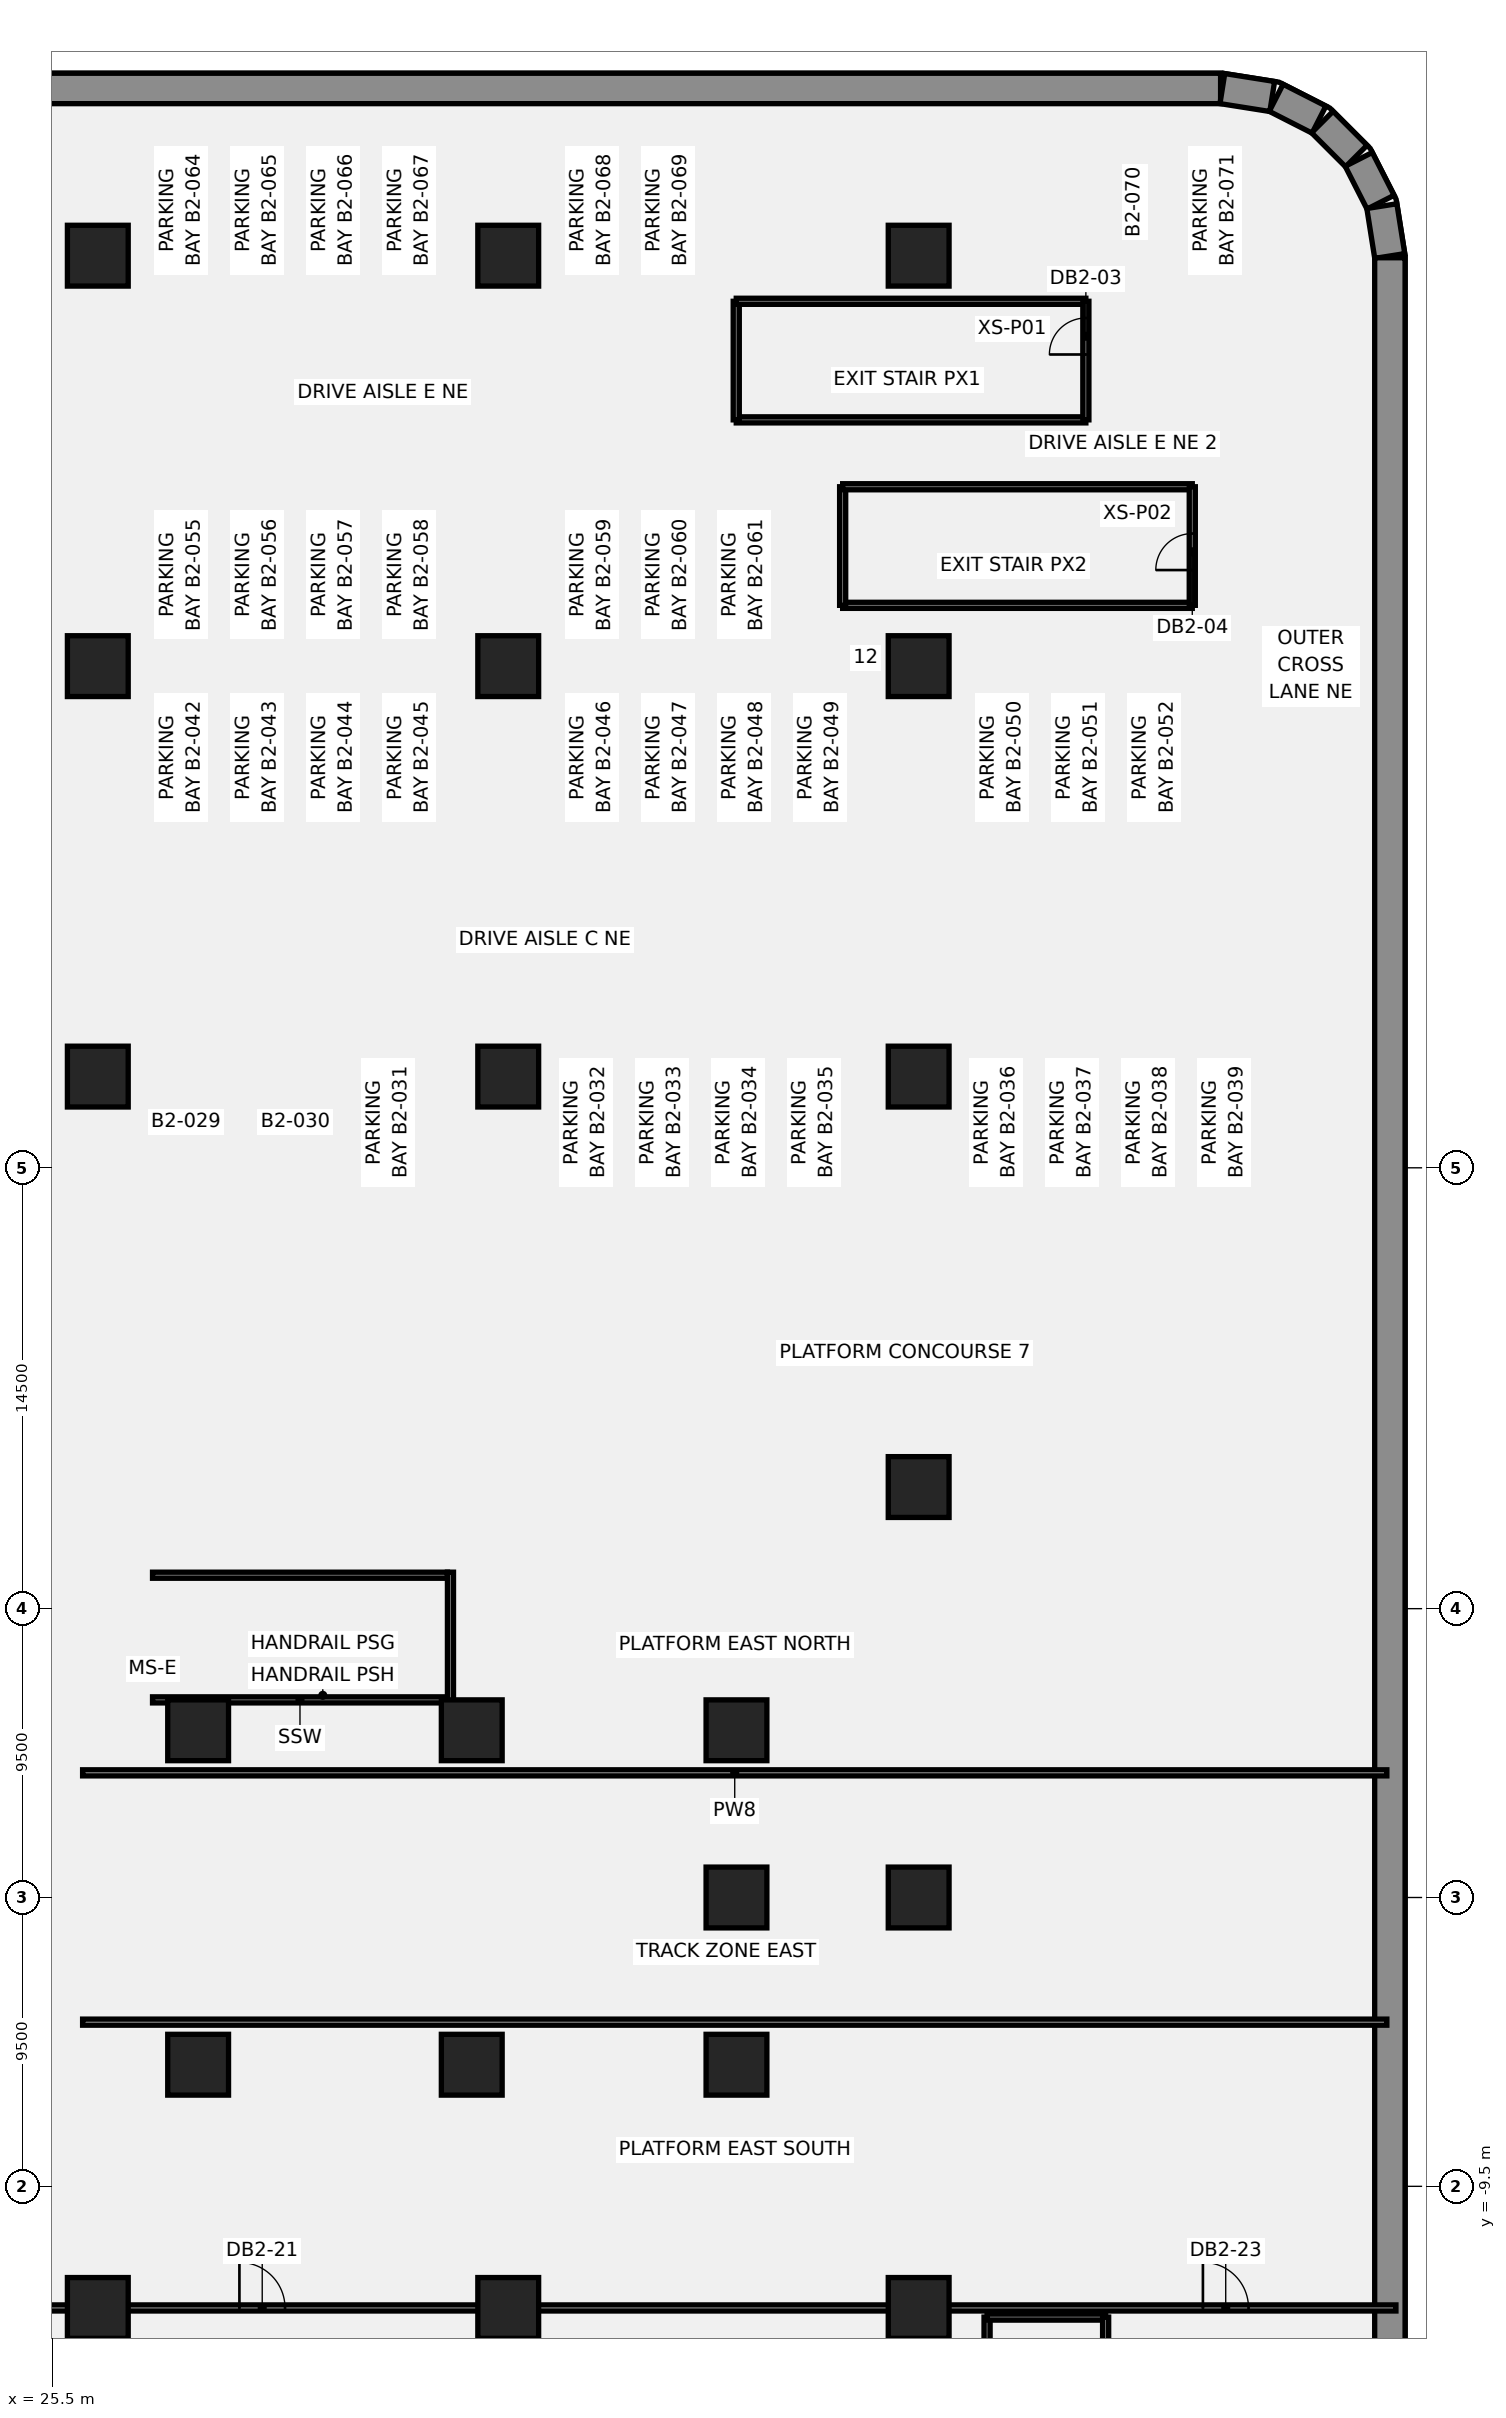
"""IFC4 building model, lengths in metres.
Left out: names, types, materials, properties, quantities, classifications, styles, units other than length and angle.
Written with IfcOpenShell. Run it as: python <this file> out.ifc"""

import sys

from ifc_helpers import new_model, si_unit, direction, frame, frame_2d, origin, origin_2d, place, context, subcontext, project, spatial, rectangle, extrude, element, fill, save


model = new_model("IFC4")
c1 = context("Model", 3, precision=1e-05, world=origin(), true_north=direction((0.0, 1.0)))
c2 = subcontext(c1, "Body", "Model", "MODEL_VIEW")
j1 = project(units=[si_unit("LENGTHUNIT", "METRE"), si_unit("PLANEANGLEUNIT", "RADIAN")], contexts=[c1])
p1 = place(None, origin())
s1 = spatial("IfcSite", under=j1, at=p1, CompositionType="ELEMENT")
p2 = place(p1, origin())
s2 = spatial("IfcBuilding", under=s1, at=p2, CompositionType="ELEMENT")
p3 = place(p2, frame((0.0, 0.0, -14.0)))
s3 = spatial("IfcBuildingStorey", under=s2, at=p3, CompositionType="ELEMENT", Elevation=-14.0)
p4 = place(p3, frame((-63.931, 59.5, -0.45), z_axis=(0.0, 0.0, 1.0), x_axis=(1.0, 0.0, 0.0)))
e1 = element("IfcWall", 1, at=p4, inside=s3, PredefinedType="SOLIDWALL", context=c2, shape_type="SweptSolid", body=[
    extrude(rectangle(XDim=127.863, YDim=1.0, at=frame_2d((63.931, 0.0))), origin(), (0.0, 0.0, 1.0), 7.0),
])
p5 = place(p3, frame((63.99, 59.495, -0.45), z_axis=(0.0, 0.0, 1.0), x_axis=(0.987688946427, -0.156430639922, 0.0)))
e2 = element("IfcWall", 2, at=p5, inside=s3, PredefinedType="SOLIDWALL", context=c2, shape_type="SweptSolid", body=[
    extrude(rectangle(XDim=1.661, YDim=1.0, at=frame_2d((0.83, 0.0))), origin(), (0.0, 0.0, 1.0), 7.0),
])
for number, where, z_axis, x_axis in (
    (3, (65.759, 59.194, -0.45), (0.0, 0.0, 1.0), (0.891, -0.454, 0.0)),
    (4, (67.278, 58.396, -0.45), (0.0, 0.0, 1.0), (0.707, -0.707, 0.0)),
    (5, (68.476, 57.168, -0.45), (0.0, 0.0, 1.0), (0.454, -0.891, 0.0)),
):
    element("IfcWall", number, at=place(p3, frame(where, z_axis=z_axis, x_axis=x_axis)), inside=s3, PredefinedType="SOLIDWALL", context=c2, shape_type="SweptSolid", body=[
        extrude(rectangle(XDim=1.581, YDim=1.0, at=frame_2d((0.791, 0.0))), origin(), (0.0, 0.0, 1.0), 7.0),
    ])
p6 = place(p3, frame((69.236, 55.63, -0.45), z_axis=(0.0, 0.0, 1.0), x_axis=(0.156430639922, -0.987688946427, 0.0)))
e6 = element("IfcWall", 6, at=p6, inside=s3, PredefinedType="SOLIDWALL", context=c2, shape_type="SweptSolid", body=[
    extrude(rectangle(XDim=1.661, YDim=1.0, at=frame_2d((0.83, 0.0))), origin(), (0.0, 0.0, 1.0), 7.0),
])
p7 = place(p3, frame((69.5, 53.931, -0.45), z_axis=(0.0, 0.0, 1.0), x_axis=(0.0, -1.0, 0.0)))
e7 = element("IfcWall", 7, at=p7, inside=s3, PredefinedType="SOLIDWALL", context=c2, shape_type="SweptSolid", body=[
    extrude(rectangle(XDim=107.863, YDim=1.0, at=frame_2d((53.931, 0.0))), origin(), (0.0, 0.0, 1.0), 7.0),
])
for number, where, z_axis, x_axis in (
    (8, (39.3, 5.5, -0.45), (0.0, 0.0, 1.0), (1.0, 0.0, 0.0)),
    (9, (39.3, -5.5, -0.45), (0.0, 0.0, 1.0), (1.0, 0.0, 0.0)),
    (10, (30.3, 5.5, -0.45), (0.0, 0.0, 1.0), (1.0, 0.0, 0.0)),
    (11, (30.3, -5.5, -0.45), (0.0, 0.0, 1.0), (1.0, 0.0, 0.0)),
    (12, (48.008, -5.5, -0.45), (0.0, 0.0, 1.0), (1.0, 0.0, 0.0)),
    (13, (48.008, 0.0, -0.45), (0.0, 0.0, 1.0), (1.0, 0.0, 0.0)),
    (14, (48.008, 5.5, -0.45), (0.0, 0.0, 1.0), (1.0, 0.0, 0.0)),
    (15, (27.0, -13.5, -0.45), (0.0, 0.0, 1.0), (1.0, 0.0, 0.0)),
    (16, (27.0, 27.0, -0.45), (0.0, 0.0, 1.0), (1.0, 0.0, 0.0)),
    (17, (27.0, 40.5, -0.45), (0.0, 0.0, 1.0), (1.0, 0.0, 0.0)),
    (18, (27.0, 54.0, -0.45), (0.0, 0.0, 1.0), (1.0, 0.0, 0.0)),
    (19, (40.5, -13.5, -0.45), (0.0, 0.0, 1.0), (1.0, 0.0, 0.0)),
    (20, (40.5, 27.0, -0.45), (0.0, 0.0, 1.0), (1.0, 0.0, 0.0)),
    (21, (40.5, 40.5, -0.45), (0.0, 0.0, 1.0), (1.0, 0.0, 0.0)),
    (22, (40.5, 54.0, -0.45), (0.0, 0.0, 1.0), (1.0, 0.0, 0.0)),
    (23, (54.0, -13.5, -0.45), (0.0, 0.0, 1.0), (1.0, 0.0, 0.0)),
    (24, (54.0, 0.0, -0.45), (0.0, 0.0, 1.0), (1.0, 0.0, 0.0)),
    (25, (54.0, 13.5, -0.45), (0.0, 0.0, 1.0), (1.0, 0.0, 0.0)),
    (26, (54.0, 27.0, -0.45), (0.0, 0.0, 1.0), (1.0, 0.0, 0.0)),
    (27, (54.0, 40.5, -0.45), (0.0, 0.0, 1.0), (1.0, 0.0, 0.0)),
    (28, (54.0, 54.0, -0.45), (0.0, 0.0, 1.0), (1.0, 0.0, 0.0)),
):
    element("IfcColumn", number, at=place(p3, frame(where, z_axis=z_axis, x_axis=x_axis)), inside=s3, PredefinedType="COLUMN", context=c2, shape_type="SweptSolid", body=[
        extrude(rectangle(XDim=2.0, YDim=2.0, at=origin_2d()), origin(), (0.0, 0.0, 1.0), 7.0),
    ])
p8 = place(p3, frame((56.25, -25.3, 0.0), z_axis=(0.0, 0.0, 1.0), x_axis=(0.0, 1.0, 0.0)))
e29 = element("IfcWall", 29, at=p8, inside=s3, PredefinedType="PARTITIONING", context=c2, shape_type="SweptSolid", body=[
    extrude(rectangle(XDim=11.5, YDim=0.2, at=frame_2d((5.75, 0.0))), origin(), (0.0, 0.0, 1.0), 6.55),
])
p9 = place(p3, frame((56.25, -13.8, 0.0), z_axis=(0.0, 0.0, 1.0), x_axis=(1.0, 0.0, 0.0)))
e30 = element("IfcWall", 30, at=p9, inside=s3, PredefinedType="PARTITIONING", context=c2, shape_type="SweptSolid", body=[
    extrude(rectangle(XDim=3.9, YDim=0.2, at=frame_2d((1.95, 0.0))), origin(), (0.0, 0.0, 1.0), 6.55),
])
for number, where, z_axis, x_axis in (
    (31, (60.15, -25.3, 0.0), (0.0, 0.0, 1.0), (0.0, 1.0, 0.0)),
    (32, (48.0, 48.6, 0.0), (0.0, 0.0, 1.0), (1.0, 0.0, 0.0)),
):
    element("IfcWall", number, at=place(p3, frame(where, z_axis=z_axis, x_axis=x_axis)), inside=s3, PredefinedType="PARTITIONING", context=c2, shape_type="SweptSolid", body=[
        extrude(rectangle(XDim=11.5, YDim=0.2, at=frame_2d((5.75, 0.0))), origin(), (0.0, 0.0, 1.0), 6.55),
    ])
p10 = place(p3, frame((48.0, 48.6, 0.0), z_axis=(0.0, 0.0, 1.0), x_axis=(0.0, 1.0, 0.0)))
e33 = element("IfcWall", 33, at=p10, inside=s3, PredefinedType="PARTITIONING", context=c2, shape_type="SweptSolid", body=[
    extrude(rectangle(XDim=3.9, YDim=0.2, at=frame_2d((1.95, 0.0))), origin(), (0.0, 0.0, 1.0), 6.55),
])
p11 = place(p3, frame((48.0, 52.5, 0.0), z_axis=(0.0, 0.0, 1.0), x_axis=(1.0, 0.0, 0.0)))
e34 = element("IfcWall", 34, at=p11, inside=s3, PredefinedType="PARTITIONING", context=c2, shape_type="SweptSolid", body=[
    extrude(rectangle(XDim=11.5, YDim=0.2, at=frame_2d((5.75, 0.0))), origin(), (0.0, 0.0, 1.0), 6.55),
])
p12 = place(p3, frame((59.5, 48.6, 0.0), z_axis=(0.0, 0.0, 1.0), x_axis=(0.0, 1.0, 0.0)))
e35 = element("IfcWall", 35, at=p12, inside=s3, PredefinedType="PARTITIONING", context=c2, shape_type="SweptSolid", body=[
    extrude(rectangle(XDim=3.9, YDim=0.2, at=frame_2d((1.95, 0.0))), origin(), (0.0, 0.0, 1.0), 6.55),
])
p13 = place(p12, frame((2.15, 0.0, 0.0)))
e36 = element("IfcOpeningElement", 36, at=p13, cuts=e35, PredefinedType="OPENING", context=c2, shape_type="SweptSolid", body=[
    extrude(rectangle(XDim=1.2, YDim=2.1, at=frame_2d((0.6, 1.05))), frame((0.0, 0.11, 0.0), z_axis=(0.0, -1.0, 0.0), x_axis=(1.0, 0.0, 0.0)), (0.0, 0.0, 1.0), 0.22),
])
p14 = place(p3, frame((51.5, 42.5, 0.0), z_axis=(0.0, 0.0, 1.0), x_axis=(1.0, 0.0, 0.0)))
e37 = element("IfcWall", 37, at=p14, inside=s3, PredefinedType="PARTITIONING", context=c2, shape_type="SweptSolid", body=[
    extrude(rectangle(XDim=11.5, YDim=0.2, at=frame_2d((5.75, 0.0))), origin(), (0.0, 0.0, 1.0), 6.55),
])
p15 = place(p3, frame((51.5, 42.5, 0.0), z_axis=(0.0, 0.0, 1.0), x_axis=(0.0, 1.0, 0.0)))
e38 = element("IfcWall", 38, at=p15, inside=s3, PredefinedType="PARTITIONING", context=c2, shape_type="SweptSolid", body=[
    extrude(rectangle(XDim=3.9, YDim=0.2, at=frame_2d((1.95, 0.0))), origin(), (0.0, 0.0, 1.0), 6.55),
])
p16 = place(p3, frame((51.5, 46.4, 0.0), z_axis=(0.0, 0.0, 1.0), x_axis=(1.0, 0.0, 0.0)))
e39 = element("IfcWall", 39, at=p16, inside=s3, PredefinedType="PARTITIONING", context=c2, shape_type="SweptSolid", body=[
    extrude(rectangle(XDim=11.5, YDim=0.2, at=frame_2d((5.75, 0.0))), origin(), (0.0, 0.0, 1.0), 6.55),
])
p17 = place(p3, frame((63.0, 42.5, 0.0), z_axis=(0.0, 0.0, 1.0), x_axis=(0.0, 1.0, 0.0)))
e40 = element("IfcWall", 40, at=p17, inside=s3, PredefinedType="PARTITIONING", context=c2, shape_type="SweptSolid", body=[
    extrude(rectangle(XDim=3.9, YDim=0.2, at=frame_2d((1.95, 0.0))), origin(), (0.0, 0.0, 1.0), 6.55),
])
p18 = place(p17, frame((1.16, 0.0, 0.0)))
e41 = element("IfcOpeningElement", 41, at=p18, cuts=e40, PredefinedType="OPENING", context=c2, shape_type="SweptSolid", body=[
    extrude(rectangle(XDim=1.2, YDim=2.1, at=frame_2d((0.6, 1.05))), frame((0.0, 0.11, 0.0), z_axis=(0.0, -1.0, 0.0), x_axis=(1.0, 0.0, 0.0)), (0.0, 0.0, 1.0), 0.22),
])
p19 = place(p3, frame((40.5, -22.5, 0.0), z_axis=(0.0, 0.0, 1.0), x_axis=(0.0, 1.0, 0.0)))
e42 = element("IfcWall", 42, at=p19, inside=s3, PredefinedType="PARTITIONING", context=c2, shape_type="SweptSolid", body=[
    extrude(rectangle(XDim=9.0, YDim=0.2, at=frame_2d((4.5, 0.0))), origin(), (0.0, 0.0, 1.0), 6.55),
])
p20 = place(p3, frame((22.5, -13.5, 0.0), z_axis=(0.0, 0.0, 1.0), x_axis=(1.0, 0.0, 0.0)))
e43 = element("IfcWall", 43, at=p20, inside=s3, PredefinedType="PARTITIONING", context=c2, shape_type="SweptSolid", body=[
    extrude(rectangle(XDim=47.199, YDim=0.2, at=frame_2d((23.6, 0.0))), origin(), (0.0, 0.0, 1.0), 6.55),
])
p21 = place(p20, frame((9.158, 0.0, 0.0)))
e44 = element("IfcOpeningElement", 44, at=p21, cuts=e43, PredefinedType="OPENING", context=c2, shape_type="SweptSolid", body=[
    extrude(rectangle(XDim=1.5, YDim=2.1, at=frame_2d((0.75, 1.05))), frame((0.0, 0.11, 0.0), z_axis=(0.0, -1.0, 0.0), x_axis=(1.0, 0.0, 0.0)), (0.0, 0.0, 1.0), 0.22),
])
p22 = place(p20, frame((40.85, 0.0, 0.0)))
e45 = element("IfcOpeningElement", 45, at=p22, cuts=e43, PredefinedType="OPENING", context=c2, shape_type="SweptSolid", body=[
    extrude(rectangle(XDim=1.5, YDim=2.1, at=frame_2d((0.75, 1.05))), frame((0.0, 0.11, 0.0), z_axis=(0.0, -1.0, 0.0), x_axis=(1.0, 0.0, 0.0)), (0.0, 0.0, 1.0), 0.22),
])
for number, where, z_axis, x_axis in (
    (46, (26.5, 4.1, 0.0), (0.0, 0.0, 1.0), (1.0, 0.0, 0.0)),
    (47, (26.5, -4.1, 0.0), (0.0, 0.0, 1.0), (1.0, 0.0, 0.0)),
):
    element("IfcWall", number, at=place(p3, frame(where, z_axis=z_axis, x_axis=x_axis)), inside=s3, PredefinedType="PARTITIONING", context=c2, shape_type="SweptSolid", body=[
        extrude(rectangle(XDim=42.9, YDim=0.2, at=frame_2d((21.45, 0.0))), origin(), (0.0, 0.0, 1.0), 6.55),
    ])
for number, where, z_axis, x_axis in (
    (48, (28.8, 6.5, 0.0), (0.0, 0.0, 1.0), (1.0, 0.0, 0.0)),
    (49, (28.8, 10.6, 0.0), (0.0, 0.0, 1.0), (1.0, 0.0, 0.0)),
):
    element("IfcWall", number, at=place(p3, frame(where, z_axis=z_axis, x_axis=x_axis)), inside=s3, PredefinedType="SOLIDWALL", context=c2, shape_type="SweptSolid", body=[
        extrude(rectangle(XDim=9.7, YDim=0.2, at=frame_2d((4.85, 0.0))), origin(), (0.0, 0.0, 1.0), 6.55),
    ])
p23 = place(p3, frame((38.6, 6.4, 0.0), z_axis=(0.0, 0.0, 1.0), x_axis=(0.0, 1.0, 0.0)))
e50 = element("IfcWall", 50, at=p23, inside=s3, PredefinedType="SOLIDWALL", context=c2, shape_type="SweptSolid", body=[
    extrude(rectangle(XDim=4.3, YDim=0.2, at=frame_2d((2.15, 0.0))), origin(), (0.0, 0.0, 1.0), 6.55),
])
p24 = place(p13, origin())
e51 = element("IfcDoor", 51, at=p24, inside=s3, OperationType="SINGLE_SWING_LEFT", PredefinedType="DOOR", context=c2, shape_type="SweptSolid", body=[
    extrude(rectangle(XDim=1.2, YDim=2.1, at=frame_2d((0.6, 1.05))), frame((0.0, 0.025, 0.0), z_axis=(0.0, -1.0, 0.0), x_axis=(1.0, 0.0, 0.0)), (0.0, 0.0, 1.0), 0.05),
])
fill(e36, e51)
p25 = place(p18, origin())
e52 = element("IfcDoor", 52, at=p25, inside=s3, OperationType="SINGLE_SWING_RIGHT", PredefinedType="DOOR", context=c2, shape_type="SweptSolid", body=[
    extrude(rectangle(XDim=1.2, YDim=2.1, at=frame_2d((0.6, 1.05))), frame((0.0, 0.025, 0.0), z_axis=(0.0, -1.0, 0.0), x_axis=(1.0, 0.0, 0.0)), (0.0, 0.0, 1.0), 0.05),
])
fill(e41, e52)
p26 = place(p21, origin())
e53 = element("IfcDoor", 53, at=p26, inside=s3, OperationType="SINGLE_SWING_LEFT", PredefinedType="DOOR", context=c2, shape_type="SweptSolid", body=[
    extrude(rectangle(XDim=1.5, YDim=2.1, at=frame_2d((0.75, 1.05))), frame((0.0, 0.025, 0.0), z_axis=(0.0, -1.0, 0.0), x_axis=(1.0, 0.0, 0.0)), (0.0, 0.0, 1.0), 0.05),
])
fill(e44, e53)
p27 = place(p22, origin())
e54 = element("IfcDoor", 54, at=p27, inside=s3, OperationType="SINGLE_SWING_LEFT", PredefinedType="DOOR", context=c2, shape_type="SweptSolid", body=[
    extrude(rectangle(XDim=1.5, YDim=2.1, at=frame_2d((0.75, 1.05))), frame((0.0, 0.025, 0.0), z_axis=(0.0, -1.0, 0.0), x_axis=(1.0, 0.0, 0.0)), (0.0, 0.0, 1.0), 0.05),
])
fill(e45, e54)
save(model, sys.argv[1])
